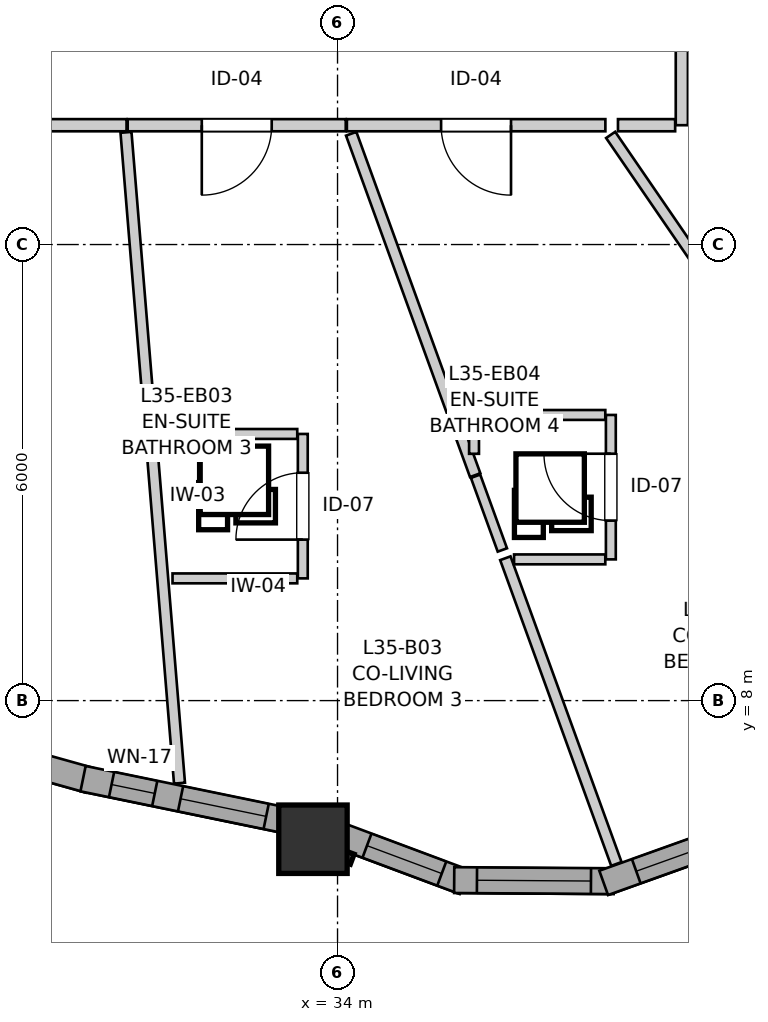
"""IFC4 building model, lengths in metres.
Left out: names, types, materials, properties, quantities, classifications, styles, units other than length and angle.
Written with IfcOpenShell. Run it as: python <this file> out.ifc"""

import sys

from ifc_helpers import new_model, si_unit, direction, frame, frame_2d, origin, origin_2d, place, context, subcontext, project, spatial, rectangle, extrude, source, transform, mapped, element, fill, save


model = new_model("IFC4")
c1 = context("Model", 3, precision=1e-05, world=origin(), true_north=direction((0.0, 1.0)))
c2 = subcontext(c1, "Body", "Model", "MODEL_VIEW")
j1 = project(units=[si_unit("LENGTHUNIT", "METRE"), si_unit("PLANEANGLEUNIT", "RADIAN")], contexts=[c1])
p1 = place(None, origin())
s1 = spatial("IfcSite", under=j1, at=p1, CompositionType="ELEMENT")
p2 = place(p1, origin())
s2 = spatial("IfcBuilding", under=s1, at=p2, CompositionType="ELEMENT")
p3 = place(p2, frame((0.0, 0.0, 118.4)))
s3 = spatial("IfcBuildingStorey", under=s2, at=p3, CompositionType="ELEMENT", Elevation=118.4)
m1 = source(origin(), c2, "Body", "SweptSolid", [
    extrude(rectangle(XDim=0.9, YDim=0.9, at=origin_2d()), origin(), (0.0, 0.0, 1.0), 2.95),
])
p4 = place(p3, frame((33.677, 6.176, 0.0), z_axis=(0.0, 0.0, 1.0), x_axis=(1.0, 0.0, 0.0)))
e1 = element("IfcColumn", 1, at=p4, inside=s3, PredefinedType="COLUMN", context=c2, shape_type="MappedRepresentation", body=[
    mapped(m1, transform((0.0, 0.0, 0.0), x_axis=(1.0, 0.0, 0.0), y_axis=(0.0, 1.0, 0.0), z_axis=(0.0, 0.0, 1.0), scale=1.0)),
])
p5 = place(p3, frame((27.811, 7.771, 0.0), z_axis=(0.0, 0.0, 1.0), x_axis=(0.963039905189, -0.269358758934, 0.0)))
e2 = element("IfcWall", 2, at=p5, inside=s3, PredefinedType="SOLIDWALL", context=c2, shape_type="SweptSolid", body=[
    extrude(rectangle(XDim=3.039, YDim=0.34, at=frame_2d((1.52, 0.0))), origin(), (0.0, 0.0, 1.0), 2.48),
])
p6 = place(p5, frame((0.935, 0.0, 0.82)))
e3 = element("IfcOpeningElement", 3, at=p6, cuts=e2, PredefinedType="OPENING", context=c2, shape_type="SweptSolid", body=[
    extrude(rectangle(XDim=1.15, YDim=1.2, at=frame_2d((0.575, 0.6))), frame((0.0, 0.18, 0.0), z_axis=(0.0, -1.0, 0.0), x_axis=(1.0, 0.0, 0.0)), (0.0, 0.0, 1.0), 0.36),
])
p7 = place(p3, frame((30.652, 6.973, 0.0), z_axis=(0.0, 0.0, 1.0), x_axis=(0.979418300652, -0.201841007595, 0.0)))
e4 = element("IfcWall", 4, at=p7, inside=s3, PredefinedType="SOLIDWALL", context=c2, shape_type="SweptSolid", body=[
    extrude(rectangle(XDim=2.893, YDim=0.34, at=frame_2d((1.447, 0.0))), origin(), (0.0, 0.0, 1.0), 2.48),
])
p8 = place(p7, frame((0.383, 0.0, 0.82)))
e5 = element("IfcOpeningElement", 5, at=p8, cuts=e4, PredefinedType="OPENING", context=c2, shape_type="SweptSolid", body=[
    extrude(rectangle(XDim=0.58, YDim=1.35, at=frame_2d((0.29, 0.675))), frame((0.0, 0.18, 0.0), z_axis=(0.0, -1.0, 0.0), x_axis=(1.0, 0.0, 0.0)), (0.0, 0.0, 1.0), 0.36),
])
p9 = place(p7, frame((1.31, 0.0, 0.82)))
e6 = element("IfcOpeningElement", 6, at=p9, cuts=e4, PredefinedType="OPENING", context=c2, shape_type="SweptSolid", body=[
    extrude(rectangle(XDim=1.15, YDim=1.2, at=frame_2d((0.575, 0.6))), frame((0.0, 0.18, 0.0), z_axis=(0.0, -1.0, 0.0), x_axis=(1.0, 0.0, 0.0)), (0.0, 0.0, 1.0), 0.36),
])
p10 = place(p3, frame((33.952, 6.255, 0.0), z_axis=(0.0, 0.0, 1.0), x_axis=(0.936799566991, -0.349866504951, 0.0)))
e7 = element("IfcWall", 7, at=p10, inside=s3, PredefinedType="SOLIDWALL", context=c2, shape_type="SweptSolid", body=[
    extrude(rectangle(XDim=1.831, YDim=0.34, at=frame_2d((0.916, 0.0))), origin(), (0.0, 0.0, 1.0), 2.48),
])
p11 = place(p10, frame((0.466, 0.0, 0.82)))
e8 = element("IfcOpeningElement", 8, at=p11, cuts=e7, PredefinedType="OPENING", context=c2, shape_type="SweptSolid", body=[
    extrude(rectangle(XDim=1.05, YDim=1.45, at=frame_2d((0.525, 0.725))), frame((0.0, 0.18, 0.0), z_axis=(0.0, -1.0, 0.0), x_axis=(1.0, 0.0, 0.0)), (0.0, 0.0, 1.0), 0.36),
])
p12 = place(p3, frame((35.535, 5.639, 0.0), z_axis=(0.0, 0.0, 1.0), x_axis=(0.999976456891, -0.00686189939, 0.0)))
e9 = element("IfcWall", 9, at=p12, inside=s3, PredefinedType="SOLIDWALL", context=c2, shape_type="SweptSolid", body=[
    extrude(rectangle(XDim=2.099, YDim=0.34, at=frame_2d((1.05, 0.0))), origin(), (0.0, 0.0, 1.0), 2.48),
])
p13 = place(p12, frame((0.3, 0.0, 0.82)))
e10 = element("IfcOpeningElement", 10, at=p13, cuts=e9, PredefinedType="OPENING", context=c2, shape_type="SweptSolid", body=[
    extrude(rectangle(XDim=1.5, YDim=1.45, at=frame_2d((0.75, 0.725))), frame((0.0, 0.18, 0.0), z_axis=(0.0, -1.0, 0.0), x_axis=(1.0, 0.0, 0.0)), (0.0, 0.0, 1.0), 0.36),
])
p14 = place(p3, frame((37.502, 5.602, 0.0), z_axis=(0.0, 0.0, 1.0), x_axis=(0.941523304278, 0.336947870598, 0.0)))
e11 = element("IfcWall", 11, at=p14, inside=s3, PredefinedType="SOLIDWALL", context=c2, shape_type="SweptSolid", body=[
    extrude(rectangle(XDim=2.099, YDim=0.34, at=frame_2d((1.05, 0.0))), origin(), (0.0, 0.0, 1.0), 2.48),
])
p15 = place(p14, frame((0.455, 0.0, 0.82)))
e12 = element("IfcOpeningElement", 12, at=p15, cuts=e11, PredefinedType="OPENING", context=c2, shape_type="SweptSolid", body=[
    extrude(rectangle(XDim=1.35, YDim=1.45, at=frame_2d((0.675, 0.725))), frame((0.0, 0.18, 0.0), z_axis=(0.0, -1.0, 0.0), x_axis=(1.0, 0.0, 0.0)), (0.0, 0.0, 1.0), 0.36),
])
p16 = place(p3, frame((38.53, 21.321, 0.0), z_axis=(0.0, 0.0, 1.0), x_axis=(0.0, -1.0, 0.0)))
e13 = element("IfcWall", 13, at=p16, inside=s3, PredefinedType="PARTITIONING", context=c2, shape_type="SweptSolid", body=[
    extrude(rectangle(XDim=5.751, YDim=0.16, at=frame_2d((2.875, 0.0))), origin(), (0.0, 0.0, 1.0), 2.95),
])
p17 = place(p16, frame((2.404, 0.0, 0.0)))
e14 = element("IfcOpeningElement", 14, at=p17, cuts=e13, PredefinedType="OPENING", context=c2, shape_type="SweptSolid", body=[
    extrude(rectangle(XDim=0.96, YDim=2.1, at=frame_2d((0.48, 1.05))), frame((0.0, 0.09, 0.0), z_axis=(0.0, -1.0, 0.0), x_axis=(1.0, 0.0, 0.0)), (0.0, 0.0, 1.0), 0.18),
])
p18 = place(p3, frame((31.224, 15.57, 0.0), z_axis=(0.0, 0.0, 1.0), x_axis=(-1.0, 0.0, 0.0)))
e15 = element("IfcWall", 15, at=p18, inside=s3, PredefinedType="PARTITIONING", context=c2, shape_type="SweptSolid", body=[
    extrude(rectangle(XDim=3.679, YDim=0.16, at=frame_2d((1.84, 0.0))), origin(), (0.0, 0.0, 1.0), 2.95),
])
p19 = place(p18, frame((1.212, 0.0, 0.0)))
e16 = element("IfcOpeningElement", 16, at=p19, cuts=e15, PredefinedType="OPENING", context=c2, shape_type="SweptSolid", body=[
    extrude(rectangle(XDim=1.3, YDim=2.1, at=frame_2d((0.65, 1.05))), frame((0.0, 0.09, 0.0), z_axis=(0.0, -1.0, 0.0), x_axis=(1.0, 0.0, 0.0)), (0.0, 0.0, 1.0), 0.18),
])
p20 = place(p3, frame((37.524, 15.57, 0.0), z_axis=(0.0, 0.0, 1.0), x_axis=(-1.0, 0.0, 0.0)))
e17 = element("IfcWall", 17, at=p20, inside=s3, PredefinedType="PARTITIONING", context=c2, shape_type="SweptSolid", body=[
    extrude(rectangle(XDim=3.401, YDim=0.16, at=frame_2d((1.7, 0.0))), origin(), (0.0, 0.0, 1.0), 2.95),
])
p21 = place(p20, frame((1.241, 0.0, 0.0)))
e18 = element("IfcOpeningElement", 18, at=p21, cuts=e17, PredefinedType="OPENING", context=c2, shape_type="SweptSolid", body=[
    extrude(rectangle(XDim=0.92, YDim=2.1, at=frame_2d((0.46, 1.05))), frame((0.0, 0.09, 0.0), z_axis=(0.0, -1.0, 0.0), x_axis=(1.0, 0.0, 0.0)), (0.0, 0.0, 1.0), 0.18),
])
p22 = place(p3, frame((34.108, 15.57, 0.0), z_axis=(0.0, 0.0, 1.0), x_axis=(-1.0, 0.0, 0.0)))
e19 = element("IfcWall", 19, at=p22, inside=s3, PredefinedType="PARTITIONING", context=c2, shape_type="SweptSolid", body=[
    extrude(rectangle(XDim=2.869, YDim=0.16, at=frame_2d((1.435, 0.0))), origin(), (0.0, 0.0, 1.0), 2.95),
])
p23 = place(p22, frame((0.974, 0.0, 0.0)))
e20 = element("IfcOpeningElement", 20, at=p23, cuts=e19, PredefinedType="OPENING", context=c2, shape_type="SweptSolid", body=[
    extrude(rectangle(XDim=0.92, YDim=2.1, at=frame_2d((0.46, 1.05))), frame((0.0, 0.09, 0.0), z_axis=(0.0, -1.0, 0.0), x_axis=(1.0, 0.0, 0.0)), (0.0, 0.0, 1.0), 0.18),
])
p24 = place(p3, frame((33.543, 9.608, 0.0), z_axis=(0.0, 0.0, 1.0), x_axis=(0.0, 1.0, 0.0)))
e21 = element("IfcWall", 21, at=p24, inside=s3, PredefinedType="PARTITIONING", context=c2, shape_type="SweptSolid", body=[
    extrude(rectangle(XDim=1.9, YDim=0.13, at=frame_2d((0.95, 0.0))), origin(), (0.0, 0.0, 1.0), 2.95),
])
p25 = place(p24, frame((0.51, 0.0, 0.0)))
e22 = element("IfcOpeningElement", 22, at=p25, cuts=e21, PredefinedType="OPENING", context=c2, shape_type="SweptSolid", body=[
    extrude(rectangle(XDim=0.88, YDim=2.05, at=frame_2d((0.44, 1.025))), frame((0.0, 0.075, 0.0), z_axis=(0.0, -1.0, 0.0), x_axis=(1.0, 0.0, 0.0)), (0.0, 0.0, 1.0), 0.15),
])
p26 = place(p3, frame((37.596, 9.858, 0.0), z_axis=(0.0, 0.0, 1.0), x_axis=(0.0, 1.0, 0.0)))
e23 = element("IfcWall", 23, at=p26, inside=s3, PredefinedType="PARTITIONING", context=c2, shape_type="SweptSolid", body=[
    extrude(rectangle(XDim=1.9, YDim=0.13, at=frame_2d((0.95, 0.0))), origin(), (0.0, 0.0, 1.0), 2.95),
])
p27 = place(p26, frame((0.51, 0.0, 0.0)))
e24 = element("IfcOpeningElement", 24, at=p27, cuts=e23, PredefinedType="OPENING", context=c2, shape_type="SweptSolid", body=[
    extrude(rectangle(XDim=0.88, YDim=2.05, at=frame_2d((0.44, 1.025))), frame((0.0, 0.075, 0.0), z_axis=(0.0, -1.0, 0.0), x_axis=(1.0, 0.0, 0.0)), (0.0, 0.0, 1.0), 0.15),
])
p28 = place(p3, frame((31.217, 15.476, 0.0), z_axis=(0.0, 0.0, 1.0), x_axis=(0.081928316893, -0.996638224679, 0.0)))
e25 = element("IfcWall", 25, at=p28, inside=s3, PredefinedType="PARTITIONING", context=c2, shape_type="SweptSolid", body=[
    extrude(rectangle(XDim=8.591, YDim=0.145, at=frame_2d((4.295, 0.0))), origin(), (0.0, 0.0, 1.0), 2.95),
])
p29 = place(p3, frame((37.594, 15.442, 0.0), z_axis=(0.0, 0.0, 1.0), x_axis=(0.565681325722, -0.824623937155, 0.0)))
e26 = element("IfcWall", 26, at=p29, inside=s3, PredefinedType="PARTITIONING", context=c2, shape_type="SweptSolid", body=[
    extrude(rectangle(XDim=7.35, YDim=0.145, at=frame_2d((3.675, 0.0))), origin(), (0.0, 0.0, 1.0), 2.95),
])
p30 = place(p3, frame((34.18, 15.458, 0.0), z_axis=(0.0, 0.0, 1.0), x_axis=(0.341373856507, -0.939927598325, 0.0)))
e27 = element("IfcWall", 27, at=p30, inside=s3, PredefinedType="PARTITIONING", context=c2, shape_type="SweptSolid", body=[
    extrude(rectangle(XDim=4.779, YDim=0.145, at=frame_2d((2.389, 0.0))), origin(), (0.0, 0.0, 1.0), 2.95),
])
p31 = place(p3, frame((36.208, 9.873, 0.0), z_axis=(0.0, 0.0, 1.0), x_axis=(0.341362804218, -0.939931612351, 0.0)))
e28 = element("IfcWall", 28, at=p31, inside=s3, PredefinedType="PARTITIONING", context=c2, shape_type="SweptSolid", body=[
    extrude(rectangle(XDim=4.279, YDim=0.145, at=frame_2d((2.14, 0.0))), origin(), (0.0, 0.0, 1.0), 2.95),
])
p32 = place(p3, frame((31.743, 11.508, 0.0), z_axis=(0.0, 0.0, 1.0), x_axis=(1.0, 0.0, 0.0)))
e29 = element("IfcWall", 29, at=p32, inside=s3, PredefinedType="PARTITIONING", context=c2, shape_type="SweptSolid", body=[
    extrude(rectangle(XDim=1.727, YDim=0.13, at=frame_2d((0.864, 0.0))), origin(), (0.0, 0.0, 1.0), 2.95),
])
p33 = place(p3, frame((31.829, 9.608, 0.0), z_axis=(0.0, 0.0, 1.0), x_axis=(1.0, 0.0, 0.0)))
e30 = element("IfcWall", 30, at=p33, inside=s3, PredefinedType="PARTITIONING", context=c2, shape_type="SweptSolid", body=[
    extrude(rectangle(XDim=1.641, YDim=0.13, at=frame_2d((0.82, 0.0))), origin(), (0.0, 0.0, 1.0), 2.558),
])
p34 = place(p3, frame((35.796, 11.758, 0.0), z_axis=(0.0, 0.0, 1.0), x_axis=(1.0, 0.0, 0.0)))
e31 = element("IfcWall", 31, at=p34, inside=s3, PredefinedType="PARTITIONING", context=c2, shape_type="SweptSolid", body=[
    extrude(rectangle(XDim=1.727, YDim=0.13, at=frame_2d((0.864, 0.0))), origin(), (0.0, 0.0, 1.0), 2.95),
])
p35 = place(p3, frame((36.323, 9.858, 0.0), z_axis=(0.0, 0.0, 1.0), x_axis=(1.0, 0.0, 0.0)))
e32 = element("IfcWall", 32, at=p35, inside=s3, PredefinedType="PARTITIONING", context=c2, shape_type="SweptSolid", body=[
    extrude(rectangle(XDim=1.2, YDim=0.13, at=frame_2d((0.6, 0.0))), origin(), (0.0, 0.0, 1.0), 2.95),
])
p36 = place(p3, frame((35.816, 10.952, 0.0), z_axis=(0.0, 0.0, 1.0), x_axis=(0.341515178303, -0.939876259403, 0.0)))
e33 = element("IfcWall", 33, at=p36, inside=s3, PredefinedType="PARTITIONING", context=c2, shape_type="SweptSolid", body=[
    extrude(rectangle(XDim=1.032, YDim=0.13, at=frame_2d((0.516, 0.0))), origin(), (0.0, 0.0, 1.0), 2.95),
])
p37 = place(p3, frame((37.69, 15.57, 0.0), z_axis=(0.0, 0.0, 1.0), x_axis=(1.0, 0.0, 0.0)))
e34 = element("IfcWall", 34, at=p37, inside=s3, PredefinedType="PARTITIONING", context=c2, shape_type="SweptSolid", body=[
    extrude(rectangle(XDim=0.752, YDim=0.16, at=frame_2d((0.376, 0.0))), origin(), (0.0, 0.0, 1.0), 2.95),
])
p38 = place(p3, frame((35.796, 11.247, 0.0), z_axis=(0.0, 0.0, 1.0), x_axis=(0.0, 1.0, 0.0)))
e35 = element("IfcWall", 35, at=p38, inside=s3, PredefinedType="PARTITIONING", context=c2, shape_type="SweptSolid", body=[
    extrude(rectangle(XDim=0.438, YDim=0.13, at=frame_2d((0.219, 0.0))), origin(), (0.0, 0.0, 1.0), 2.95),
])
m2 = source(origin(), c2, "Body", "SweptSolid", [
    extrude(rectangle(XDim=0.58, YDim=1.35, at=frame_2d((0.29, 0.675))), frame((0.0, 0.03, 0.0), z_axis=(0.0, -1.0, 0.0), x_axis=(1.0, 0.0, 0.0)), (0.0, 0.0, 1.0), 0.06),
])
p39 = place(p8, origin())
e36 = element("IfcWindow", 36, at=p39, inside=s3, PartitioningType="SINGLE_PANEL", PredefinedType="WINDOW", context=c2, shape_type="MappedRepresentation", body=[
    mapped(m2, transform((0.0, 0.0, 0.0), x_axis=(1.0, 0.0, 0.0), y_axis=(0.0, 1.0, 0.0), z_axis=(0.0, 0.0, 1.0), scale=1.0)),
])
fill(e5, e36)
m3 = source(origin(), c2, "Body", "SweptSolid", [
    extrude(rectangle(XDim=1.15, YDim=1.2, at=frame_2d((0.575, 0.6))), frame((0.0, 0.03, 0.0), z_axis=(0.0, -1.0, 0.0), x_axis=(1.0, 0.0, 0.0)), (0.0, 0.0, 1.0), 0.06),
])
p40 = place(p9, origin())
e37 = element("IfcWindow", 37, at=p40, inside=s3, PartitioningType="SINGLE_PANEL", PredefinedType="WINDOW", context=c2, shape_type="MappedRepresentation", body=[
    mapped(m3, transform((0.0, 0.0, 0.0), x_axis=(1.0, 0.0, 0.0), y_axis=(0.0, 1.0, 0.0), z_axis=(0.0, 0.0, 1.0), scale=1.0)),
])
fill(e6, e37)
m4 = source(origin(), c2, "Body", "SweptSolid", [
    extrude(rectangle(XDim=1.05, YDim=1.45, at=frame_2d((0.525, 0.725))), frame((0.0, 0.03, 0.0), z_axis=(0.0, -1.0, 0.0), x_axis=(1.0, 0.0, 0.0)), (0.0, 0.0, 1.0), 0.06),
])
p41 = place(p11, origin())
e38 = element("IfcWindow", 38, at=p41, inside=s3, PartitioningType="SINGLE_PANEL", PredefinedType="WINDOW", context=c2, shape_type="MappedRepresentation", body=[
    mapped(m4, transform((0.0, 0.0, 0.0), x_axis=(1.0, 0.0, 0.0), y_axis=(0.0, 1.0, 0.0), z_axis=(0.0, 0.0, 1.0), scale=1.0)),
])
fill(e8, e38)
m5 = source(origin(), c2, "Body", "SweptSolid", [
    extrude(rectangle(XDim=1.5, YDim=1.45, at=frame_2d((0.75, 0.725))), frame((0.0, 0.03, 0.0), z_axis=(0.0, -1.0, 0.0), x_axis=(1.0, 0.0, 0.0)), (0.0, 0.0, 1.0), 0.06),
])
p42 = place(p13, origin())
e39 = element("IfcWindow", 39, at=p42, inside=s3, PartitioningType="SINGLE_PANEL", PredefinedType="WINDOW", context=c2, shape_type="MappedRepresentation", body=[
    mapped(m5, transform((0.0, 0.0, 0.0), x_axis=(1.0, 0.0, 0.0), y_axis=(0.0, 1.0, 0.0), z_axis=(0.0, 0.0, 1.0), scale=1.0)),
])
fill(e10, e39)
m6 = source(origin(), c2, "Body", "SweptSolid", [
    extrude(rectangle(XDim=1.35, YDim=1.45, at=frame_2d((0.675, 0.725))), frame((0.0, 0.03, 0.0), z_axis=(0.0, -1.0, 0.0), x_axis=(1.0, 0.0, 0.0)), (0.0, 0.0, 1.0), 0.06),
])
p43 = place(p15, origin())
e40 = element("IfcWindow", 40, at=p43, inside=s3, PartitioningType="SINGLE_PANEL", PredefinedType="WINDOW", context=c2, shape_type="MappedRepresentation", body=[
    mapped(m6, transform((0.0, 0.0, 0.0), x_axis=(1.0, 0.0, 0.0), y_axis=(0.0, 1.0, 0.0), z_axis=(0.0, 0.0, 1.0), scale=1.0)),
])
fill(e12, e40)
m7 = source(origin(), c2, "Body", "SweptSolid", [
    extrude(rectangle(XDim=0.92, YDim=2.1, at=frame_2d((0.46, 1.05))), frame((0.0, 0.025, 0.0), z_axis=(0.0, -1.0, 0.0), x_axis=(1.0, 0.0, 0.0)), (0.0, 0.0, 1.0), 0.05),
])
p44 = place(p21, origin())
e41 = element("IfcDoor", 41, at=p44, inside=s3, OperationType="SINGLE_SWING_LEFT", PredefinedType="DOOR", context=c2, shape_type="MappedRepresentation", body=[
    mapped(m7, transform((0.0, 0.0, 0.0), x_axis=(1.0, 0.0, 0.0), y_axis=(0.0, 1.0, 0.0), z_axis=(0.0, 0.0, 1.0), scale=1.0)),
])
fill(e18, e41)
p45 = place(p23, origin())
e42 = element("IfcDoor", 42, at=p45, inside=s3, OperationType="SINGLE_SWING_RIGHT", PredefinedType="DOOR", context=c2, shape_type="MappedRepresentation", body=[
    mapped(m7, transform((0.0, 0.0, 0.0), x_axis=(1.0, 0.0, 0.0), y_axis=(0.0, 1.0, 0.0), z_axis=(0.0, 0.0, 1.0), scale=1.0)),
])
fill(e20, e42)
m8 = source(origin(), c2, "Body", "SweptSolid", [
    extrude(rectangle(XDim=0.88, YDim=2.05, at=frame_2d((0.44, 1.025))), frame((0.0, 0.025, 0.0), z_axis=(0.0, -1.0, 0.0), x_axis=(1.0, 0.0, 0.0)), (0.0, 0.0, 1.0), 0.05),
])
p46 = place(p25, origin())
e43 = element("IfcDoor", 43, at=p46, inside=s3, OperationType="SINGLE_SWING_LEFT", PredefinedType="DOOR", context=c2, shape_type="MappedRepresentation", body=[
    mapped(m8, transform((0.0, 0.0, 0.0), x_axis=(1.0, 0.0, 0.0), y_axis=(0.0, 1.0, 0.0), z_axis=(0.0, 0.0, 1.0), scale=1.0)),
])
fill(e22, e43)
p47 = place(p27, origin())
e44 = element("IfcDoor", 44, at=p47, inside=s3, OperationType="SINGLE_SWING_RIGHT", PredefinedType="DOOR", context=c2, shape_type="MappedRepresentation", body=[
    mapped(m8, transform((0.0, 0.0, 0.0), x_axis=(1.0, 0.0, 0.0), y_axis=(0.0, 1.0, 0.0), z_axis=(0.0, 0.0, 1.0), scale=1.0)),
])
fill(e24, e44)
save(model, sys.argv[1])
